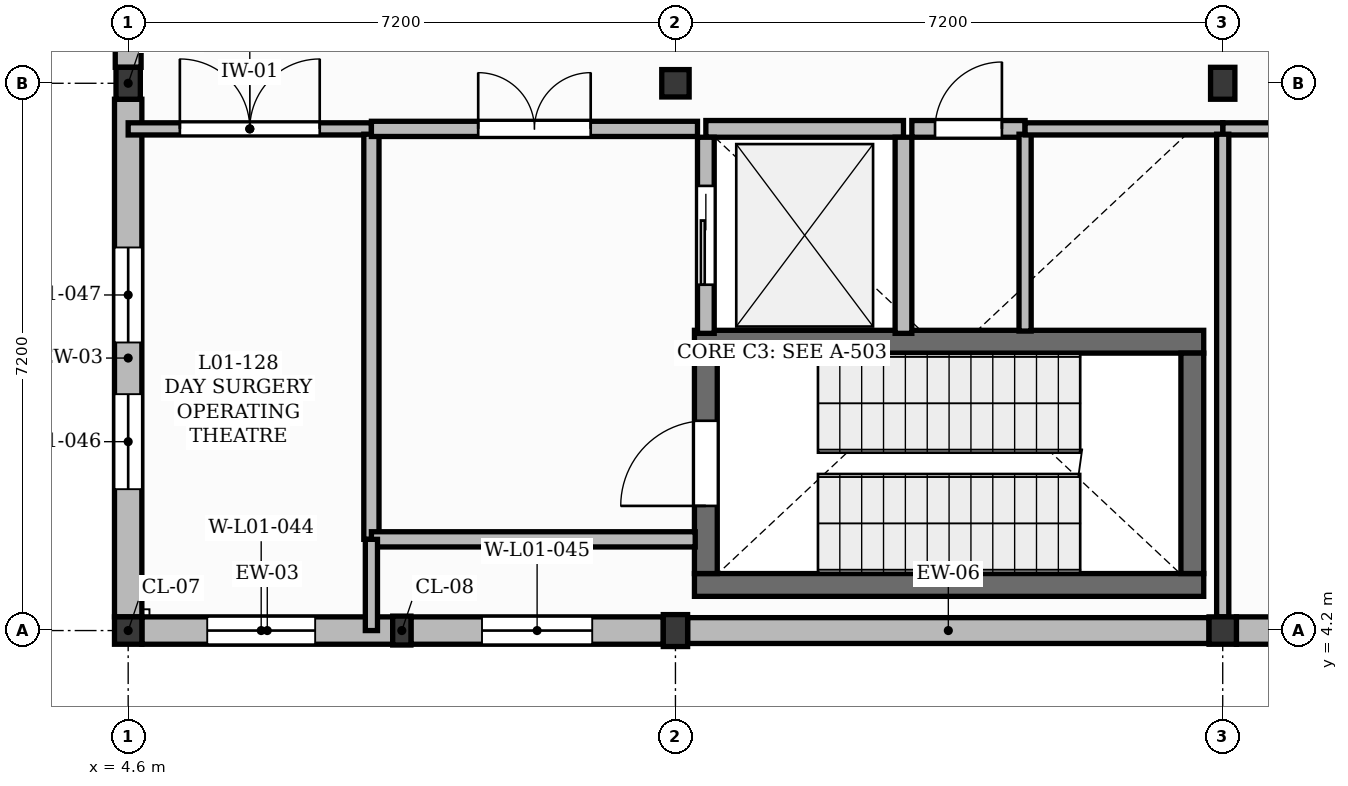
"""IFC4 building model, lengths in metres.
Left out: names, types, materials, properties, quantities, classifications, styles, units other than length and angle.
Written with IfcOpenShell. Run it as: python <this file> out.ifc"""

import sys

from ifc_helpers import new_model, si_unit, direction, frame, frame_2d, origin, origin_2d, place, context, subcontext, project, spatial, rectangle, extrude, element, fill, save


model = new_model("IFC4")
c1 = context("Model", 3, precision=1e-05, world=origin(), true_north=direction((0.0, 1.0)))
c2 = subcontext(c1, "Body", "Model", "MODEL_VIEW")
j1 = project(units=[si_unit("LENGTHUNIT", "METRE"), si_unit("PLANEANGLEUNIT", "RADIAN")], contexts=[c1])
p1 = place(None, origin())
s1 = spatial("IfcSite", under=j1, at=p1, CompositionType="ELEMENT")
p2 = place(p1, origin())
s2 = spatial("IfcBuilding", under=s1, at=p2, CompositionType="ELEMENT")
p3 = place(p2, frame((0.0, 0.0, 4.5)))
s3 = spatial("IfcBuildingStorey", under=s2, at=p3, CompositionType="ELEMENT", Elevation=4.5)
p4 = place(p3, frame((4.6, 4.2, 0.0), z_axis=(0.0, 0.0, 1.0), x_axis=(1.0, 0.0, 0.0)))
e1 = element("IfcColumn", 1, at=p4, inside=s3, PredefinedType="COLUMN", context=c2, shape_type="SweptSolid", body=[
    extrude(rectangle(XDim=0.36, YDim=0.36, at=origin_2d()), origin(), (0.0, 0.0, 1.0), 4.26),
])
for number, where, z_axis, x_axis in (
    (2, (4.6, 11.4, 0.0), (0.0, 0.0, 1.0), (1.0, 0.0, 0.0)),
    (3, (11.8, 4.2, 0.0), (0.0, 0.0, 1.0), (1.0, 0.0, 0.0)),
):
    element("IfcColumn", number, at=place(p3, frame(where, z_axis=z_axis, x_axis=x_axis)), inside=s3, PredefinedType="COLUMN", context=c2, shape_type="SweptSolid", body=[
        extrude(rectangle(XDim=0.32, YDim=0.42, at=origin_2d()), origin(), (0.0, 0.0, 1.0), 4.26),
    ])
for number, where, z_axis, x_axis in (
    (4, (11.8, 11.4, 0.0), (0.0, 0.0, 1.0), (1.0, 0.0, 0.0)),
    (5, (19.0, 4.2, 0.0), (0.0, 0.0, 1.0), (1.0, 0.0, 0.0)),
):
    element("IfcColumn", number, at=place(p3, frame(where, z_axis=z_axis, x_axis=x_axis)), inside=s3, PredefinedType="COLUMN", context=c2, shape_type="SweptSolid", body=[
        extrude(rectangle(XDim=0.36, YDim=0.36, at=origin_2d()), origin(), (0.0, 0.0, 1.0), 4.26),
    ])
p5 = place(p3, frame((19.0, 11.4, 0.0), z_axis=(0.0, 0.0, 1.0), x_axis=(1.0, 0.0, 0.0)))
e6 = element("IfcColumn", 6, at=p5, inside=s3, PredefinedType="COLUMN", context=c2, shape_type="SweptSolid", body=[
    extrude(rectangle(XDim=0.32, YDim=0.42, at=origin_2d()), origin(), (0.0, 0.0, 1.0), 4.26),
])
p6 = place(p3, frame((8.2, 4.2, 0.0), z_axis=(0.0, 0.0, 1.0), x_axis=(1.0, 0.0, 0.0)))
e7 = element("IfcColumn", 7, at=p6, inside=s3, PredefinedType="PILASTER", context=c2, shape_type="SweptSolid", body=[
    extrude(rectangle(XDim=0.24, YDim=0.38, at=origin_2d()), origin(), (0.0, 0.0, 1.0), 4.26),
])
p7 = place(p3, frame((4.78, 4.2, 0.0), z_axis=(0.0, 0.0, 1.0), x_axis=(1.0, 0.0, 0.0)))
e8 = element("IfcWall", 8, at=p7, inside=s3, PredefinedType="SOLIDWALL", context=c2, shape_type="SweptSolid", body=[
    extrude(rectangle(XDim=3.3, YDim=0.36, at=frame_2d((1.65, 0.0))), origin(), (0.0, 0.0, 1.0), 3.8),
])
p8 = place(p7, frame((0.86, 0.0, 0.9)))
e9 = element("IfcOpeningElement", 9, at=p8, cuts=e8, PredefinedType="OPENING", context=c2, shape_type="SweptSolid", body=[
    extrude(rectangle(XDim=1.42, YDim=2.4, at=frame_2d((0.71, 1.2))), frame((0.0, 0.19, 0.0), z_axis=(0.0, -1.0, 0.0), x_axis=(1.0, 0.0, 0.0)), (0.0, 0.0, 1.0), 0.38),
])
p9 = place(p3, frame((8.32, 4.2, 0.0), z_axis=(0.0, 0.0, 1.0), x_axis=(1.0, 0.0, 0.0)))
e10 = element("IfcWall", 10, at=p9, inside=s3, PredefinedType="SOLIDWALL", context=c2, shape_type="SweptSolid", body=[
    extrude(rectangle(XDim=3.32, YDim=0.36, at=frame_2d((1.66, 0.0))), origin(), (0.0, 0.0, 1.0), 3.8),
])
p10 = place(p9, frame((0.935, 0.0, 1.35)))
e11 = element("IfcOpeningElement", 11, at=p10, cuts=e10, PredefinedType="OPENING", context=c2, shape_type="SweptSolid", body=[
    extrude(rectangle(XDim=1.45, YDim=1.4, at=frame_2d((0.725, 0.7))), frame((0.0, 0.19, 0.0), z_axis=(0.0, -1.0, 0.0), x_axis=(1.0, 0.0, 0.0)), (0.0, 0.0, 1.0), 0.38),
])
p11 = place(p3, frame((4.6, 4.38, 0.0), z_axis=(0.0, 0.0, 1.0), x_axis=(0.0, 1.0, 0.0)))
e12 = element("IfcWall", 12, at=p11, inside=s3, PredefinedType="SOLIDWALL", context=c2, shape_type="SweptSolid", body=[
    extrude(rectangle(XDim=6.81, YDim=0.36, at=frame_2d((3.405, 0.0))), origin(), (0.0, 0.0, 1.0), 3.8),
])
p12 = place(p11, frame((1.68, 0.0, 1.35)))
e13 = element("IfcOpeningElement", 13, at=p12, cuts=e12, PredefinedType="OPENING", context=c2, shape_type="SweptSolid", body=[
    extrude(rectangle(XDim=1.25, YDim=1.4, at=frame_2d((0.625, 0.7))), frame((0.0, 0.19, 0.0), z_axis=(0.0, -1.0, 0.0), x_axis=(1.0, 0.0, 0.0)), (0.0, 0.0, 1.0), 0.38),
])
p13 = place(p11, frame((3.61, 0.0, 1.35)))
e14 = element("IfcOpeningElement", 14, at=p13, cuts=e12, PredefinedType="OPENING", context=c2, shape_type="SweptSolid", body=[
    extrude(rectangle(XDim=1.25, YDim=1.4, at=frame_2d((0.625, 0.7))), frame((0.0, 0.19, 0.0), z_axis=(0.0, -1.0, 0.0), x_axis=(1.0, 0.0, 0.0)), (0.0, 0.0, 1.0), 0.38),
])
p14 = place(p3, frame((4.6, 11.61, 0.0), z_axis=(0.0, 0.0, 1.0), x_axis=(0.0, 1.0, 0.0)))
e15 = element("IfcWall", 15, at=p14, inside=s3, PredefinedType="SOLIDWALL", context=c2, shape_type="SweptSolid", body=[
    extrude(rectangle(XDim=6.81, YDim=0.34, at=frame_2d((3.405, 0.0))), origin(), (0.0, 0.0, 1.0), 3.8),
])
p15 = place(p14, frame((3.415, 0.0, 1.35)))
e16 = element("IfcOpeningElement", 16, at=p15, cuts=e15, PredefinedType="OPENING", context=c2, shape_type="SweptSolid", body=[
    extrude(rectangle(XDim=1.65, YDim=1.4, at=frame_2d((0.825, 0.7))), frame((0.0, 0.18, 0.0), z_axis=(0.0, -1.0, 0.0), x_axis=(1.0, 0.0, 0.0)), (0.0, 0.0, 1.0), 0.36),
])
p16 = place(p3, frame((11.96, 4.2, 0.0), z_axis=(0.0, 0.0, 1.0), x_axis=(1.0, 0.0, 0.0)))
e17 = element("IfcWall", 17, at=p16, inside=s3, PredefinedType="SOLIDWALL", context=c2, shape_type="SweptSolid", body=[
    extrude(rectangle(XDim=6.86, YDim=0.34, at=frame_2d((3.43, 0.0))), origin(), (0.0, 0.0, 1.0), 3.8),
])
p17 = place(p3, frame((19.18, 4.2, 0.0), z_axis=(0.0, 0.0, 1.0), x_axis=(1.0, 0.0, 0.0)))
e18 = element("IfcWall", 18, at=p17, inside=s3, PredefinedType="SOLIDWALL", context=c2, shape_type="SweptSolid", body=[
    extrude(rectangle(XDim=3.3, YDim=0.36, at=frame_2d((1.65, 0.0))), origin(), (0.0, 0.0, 1.0), 3.8),
])
p18 = place(p17, frame((0.85, 0.0, 1.0)))
e19 = element("IfcOpeningElement", 19, at=p18, cuts=e18, PredefinedType="OPENING", context=c2, shape_type="SweptSolid", body=[
    extrude(rectangle(XDim=1.6, YDim=2.2, at=frame_2d((0.8, 1.1))), frame((0.0, 0.19, 0.0), z_axis=(0.0, -1.0, 0.0), x_axis=(1.0, 0.0, 0.0)), (0.0, 0.0, 1.0), 0.38),
])
for number, where, z_axis, x_axis in (
    (20, (12.05, 4.8, 0.0), (0.0, 0.0, 1.0), (1.0, 0.0, 0.0)),
    (21, (12.05, 8.0, 0.0), (0.0, 0.0, 1.0), (1.0, 0.0, 0.0)),
):
    element("IfcWall", number, at=place(p3, frame(where, z_axis=z_axis, x_axis=x_axis)), inside=s3, PredefinedType="SHEAR", context=c2, shape_type="SweptSolid", body=[
        extrude(rectangle(XDim=6.7, YDim=0.3, at=frame_2d((3.35, 0.0))), origin(), (0.0, 0.0, 1.0), 4.25),
    ])
p19 = place(p3, frame((12.2, 4.95, 0.0), z_axis=(0.0, 0.0, 1.0), x_axis=(0.0, 1.0, 0.0)))
e22 = element("IfcWall", 22, at=p19, inside=s3, PredefinedType="SHEAR", context=c2, shape_type="SweptSolid", body=[
    extrude(rectangle(XDim=2.9, YDim=0.3, at=frame_2d((1.45, 0.0))), origin(), (0.0, 0.0, 1.0), 4.25),
])
p20 = place(p19, frame((0.89, 0.0, 0.0)))
e23 = element("IfcOpeningElement", 23, at=p20, cuts=e22, PredefinedType="OPENING", context=c2, shape_type="SweptSolid", body=[
    extrude(rectangle(XDim=1.12, YDim=2.1, at=frame_2d((0.56, 1.05))), frame((0.0, 0.16, 0.0), z_axis=(0.0, -1.0, 0.0), x_axis=(1.0, 0.0, 0.0)), (0.0, 0.0, 1.0), 0.32),
])
p21 = place(p3, frame((18.6, 4.95, 0.0), z_axis=(0.0, 0.0, 1.0), x_axis=(0.0, 1.0, 0.0)))
e24 = element("IfcWall", 24, at=p21, inside=s3, PredefinedType="SHEAR", context=c2, shape_type="SweptSolid", body=[
    extrude(rectangle(XDim=2.9, YDim=0.3, at=frame_2d((1.45, 0.0))), origin(), (0.0, 0.0, 1.0), 4.25),
])
p22 = place(p3, frame((12.2, 10.8, 0.0), z_axis=(0.0, 0.0, 1.0), x_axis=(1.0, 0.0, 0.0)))
e25 = element("IfcWall", 25, at=p22, inside=s3, PredefinedType="SOLIDWALL", context=c2, shape_type="SweptSolid", body=[
    extrude(rectangle(XDim=2.6, YDim=0.22, at=frame_2d((1.3, 0.0))), origin(), (0.0, 0.0, 1.0), 4.25),
])
p23 = place(p3, frame((12.2, 8.11, 0.0), z_axis=(0.0, 0.0, 1.0), x_axis=(0.0, 1.0, 0.0)))
e26 = element("IfcWall", 26, at=p23, inside=s3, PredefinedType="SOLIDWALL", context=c2, shape_type="SweptSolid", body=[
    extrude(rectangle(XDim=2.58, YDim=0.22, at=frame_2d((1.29, 0.0))), origin(), (0.0, 0.0, 1.0), 4.25),
])
p24 = place(p23, frame((0.64, 0.0, 0.0)))
e27 = element("IfcOpeningElement", 27, at=p24, cuts=e26, PredefinedType="OPENING", context=c2, shape_type="SweptSolid", body=[
    extrude(rectangle(XDim=1.3, YDim=2.2, at=frame_2d((0.65, 1.1))), frame((0.0, 0.12, 0.0), z_axis=(0.0, -1.0, 0.0), x_axis=(1.0, 0.0, 0.0)), (0.0, 0.0, 1.0), 0.24),
])
p25 = place(p3, frame((14.8, 8.11, 0.0), z_axis=(0.0, 0.0, 1.0), x_axis=(0.0, 1.0, 0.0)))
e28 = element("IfcWall", 28, at=p25, inside=s3, PredefinedType="SOLIDWALL", context=c2, shape_type="SweptSolid", body=[
    extrude(rectangle(XDim=2.58, YDim=0.22, at=frame_2d((1.29, 0.0))), origin(), (0.0, 0.0, 1.0), 4.25),
])
p26 = place(p3, frame((4.6, 10.8, 0.0), z_axis=(0.0, 0.0, 1.0), x_axis=(1.0, 0.0, 0.0)))
e29 = element("IfcWall", 29, at=p26, inside=s3, PredefinedType="PARTITIONING", context=c2, shape_type="SweptSolid", body=[
    extrude(rectangle(XDim=3.2, YDim=0.16, at=frame_2d((1.6, 0.0))), origin(), (0.0, 0.0, 1.0), 4.18),
])
p27 = place(p26, frame((0.68, 0.0, 0.0)))
e30 = element("IfcOpeningElement", 30, at=p27, cuts=e29, PredefinedType="OPENING", context=c2, shape_type="SweptSolid", body=[
    extrude(rectangle(XDim=1.84, YDim=2.35, at=frame_2d((0.92, 1.175))), frame((0.0, 0.09, 0.0), z_axis=(0.0, -1.0, 0.0), x_axis=(1.0, 0.0, 0.0)), (0.0, 0.0, 1.0), 0.18),
])
p28 = place(p3, frame((7.8, 5.4, 0.0), z_axis=(0.0, 0.0, 1.0), x_axis=(0.0, 1.0, 0.0)))
e31 = element("IfcWall", 31, at=p28, inside=s3, PredefinedType="PARTITIONING", context=c2, shape_type="SweptSolid", body=[
    extrude(rectangle(XDim=5.33, YDim=0.2, at=frame_2d((2.665, 0.0))), origin(), (0.0, 0.0, 1.0), 4.18),
])
p29 = place(p3, frame((7.8, 10.8, 0.0), z_axis=(0.0, 0.0, 1.0), x_axis=(1.0, 0.0, 0.0)))
e32 = element("IfcWall", 32, at=p29, inside=s3, PredefinedType="PARTITIONING", context=c2, shape_type="SweptSolid", body=[
    extrude(rectangle(XDim=4.29, YDim=0.2, at=frame_2d((2.145, 0.0))), origin(), (0.0, 0.0, 1.0), 4.18),
])
p30 = place(p29, frame((1.405, 0.0, 0.0)))
e33 = element("IfcOpeningElement", 33, at=p30, cuts=e32, PredefinedType="OPENING", context=c2, shape_type="SweptSolid", body=[
    extrude(rectangle(XDim=1.48, YDim=2.25, at=frame_2d((0.74, 1.125))), frame((0.0, 0.11, 0.0), z_axis=(0.0, -1.0, 0.0), x_axis=(1.0, 0.0, 0.0)), (0.0, 0.0, 1.0), 0.22),
])
p31 = place(p3, frame((14.91, 10.8, 0.0), z_axis=(0.0, 0.0, 1.0), x_axis=(1.0, 0.0, 0.0)))
e34 = element("IfcWall", 34, at=p31, inside=s3, PredefinedType="SOLIDWALL", context=c2, shape_type="SweptSolid", body=[
    extrude(rectangle(XDim=1.49, YDim=0.22, at=frame_2d((0.745, 0.0))), origin(), (0.0, 0.0, 1.0), 4.18),
])
p32 = place(p31, frame((0.305, 0.0, 0.0)))
e35 = element("IfcOpeningElement", 35, at=p32, cuts=e34, PredefinedType="OPENING", context=c2, shape_type="SweptSolid", body=[
    extrude(rectangle(XDim=0.88, YDim=2.05, at=frame_2d((0.44, 1.025))), frame((0.0, 0.12, 0.0), z_axis=(0.0, -1.0, 0.0), x_axis=(1.0, 0.0, 0.0)), (0.0, 0.0, 1.0), 0.24),
])
p33 = place(p3, frame((19.0, 10.8, 0.0), z_axis=(0.0, 0.0, 1.0), x_axis=(1.0, 0.0, 0.0)))
e36 = element("IfcWall", 36, at=p33, inside=s3, PredefinedType="PARTITIONING", context=c2, shape_type="SweptSolid", body=[
    extrude(rectangle(XDim=7.2, YDim=0.16, at=frame_2d((3.6, 0.0))), origin(), (0.0, 0.0, 1.0), 4.18),
])
p34 = place(p33, frame((2.68, 0.0, 0.0)))
e37 = element("IfcOpeningElement", 37, at=p34, cuts=e36, PredefinedType="OPENING", context=c2, shape_type="SweptSolid", body=[
    extrude(rectangle(XDim=1.84, YDim=2.35, at=frame_2d((0.92, 1.175))), frame((0.0, 0.09, 0.0), z_axis=(0.0, -1.0, 0.0), x_axis=(1.0, 0.0, 0.0)), (0.0, 0.0, 1.0), 0.18),
])
p35 = place(p3, frame((16.4, 8.14, 0.0), z_axis=(0.0, 0.0, 1.0), x_axis=(0.0, 1.0, 0.0)))
e38 = element("IfcWall", 38, at=p35, inside=s3, PredefinedType="PARTITIONING", context=c2, shape_type="SweptSolid", body=[
    extrude(rectangle(XDim=2.59, YDim=0.16, at=frame_2d((1.295, 0.0))), origin(), (0.0, 0.0, 1.0), 4.18),
])
p36 = place(p3, frame((7.8, 5.4, 0.0), z_axis=(0.0, 0.0, 1.0), x_axis=(1.0, 0.0, 0.0)))
e39 = element("IfcWall", 39, at=p36, inside=s3, PredefinedType="PARTITIONING", context=c2, shape_type="SweptSolid", body=[
    extrude(rectangle(XDim=4.26, YDim=0.2, at=frame_2d((2.13, 0.0))), origin(), (0.0, 0.0, 1.0), 4.18),
])
p37 = place(p3, frame((16.4, 10.8, 0.0), z_axis=(0.0, 0.0, 1.0), x_axis=(1.0, 0.0, 0.0)))
e40 = element("IfcWall", 40, at=p37, inside=s3, PredefinedType="PARTITIONING", context=c2, shape_type="SweptSolid", body=[
    extrude(rectangle(XDim=2.6, YDim=0.16, at=frame_2d((1.3, 0.0))), origin(), (0.0, 0.0, 1.0), 4.18),
])
p38 = place(p3, frame((7.8, 4.2, 0.0), z_axis=(0.0, 0.0, 1.0), x_axis=(0.0, 1.0, 0.0)))
e41 = element("IfcWall", 41, at=p38, inside=s3, PredefinedType="PARTITIONING", context=c2, shape_type="SweptSolid", body=[
    extrude(rectangle(XDim=1.2, YDim=0.16, at=frame_2d((0.6, 0.0))), origin(), (0.0, 0.0, 1.0), 4.18),
])
p39 = place(p3, frame((19.0, 4.38, 0.0), z_axis=(0.0, 0.0, 1.0), x_axis=(0.0, 1.0, 0.0)))
e42 = element("IfcWall", 42, at=p39, inside=s3, PredefinedType="PARTITIONING", context=c2, shape_type="SweptSolid", body=[
    extrude(rectangle(XDim=6.35, YDim=0.16, at=frame_2d((3.175, 0.0))), origin(), (0.0, 0.0, 1.0), 3.74),
])
p40 = place(p8, origin())
e43 = element("IfcWindow", 43, at=p40, inside=s3, PartitioningType="SINGLE_PANEL", PredefinedType="WINDOW", context=c2, shape_type="SweptSolid", body=[
    extrude(rectangle(XDim=1.42, YDim=2.4, at=frame_2d((0.71, 1.2))), frame((0.0, 0.03, 0.0), z_axis=(0.0, -1.0, 0.0), x_axis=(1.0, 0.0, 0.0)), (0.0, 0.0, 1.0), 0.06),
])
fill(e9, e43)
p41 = place(p10, origin())
e44 = element("IfcWindow", 44, at=p41, inside=s3, PartitioningType="SINGLE_PANEL", PredefinedType="WINDOW", context=c2, shape_type="SweptSolid", body=[
    extrude(rectangle(XDim=1.45, YDim=1.4, at=frame_2d((0.725, 0.7))), frame((0.0, 0.03, 0.0), z_axis=(0.0, -1.0, 0.0), x_axis=(1.0, 0.0, 0.0)), (0.0, 0.0, 1.0), 0.06),
])
fill(e11, e44)
p42 = place(p12, origin())
e45 = element("IfcWindow", 45, at=p42, inside=s3, PartitioningType="SINGLE_PANEL", PredefinedType="WINDOW", context=c2, shape_type="SweptSolid", body=[
    extrude(rectangle(XDim=1.25, YDim=1.4, at=frame_2d((0.625, 0.7))), frame((0.0, 0.03, 0.0), z_axis=(0.0, -1.0, 0.0), x_axis=(1.0, 0.0, 0.0)), (0.0, 0.0, 1.0), 0.06),
])
fill(e13, e45)
p43 = place(p13, origin())
e46 = element("IfcWindow", 46, at=p43, inside=s3, PartitioningType="SINGLE_PANEL", PredefinedType="WINDOW", context=c2, shape_type="SweptSolid", body=[
    extrude(rectangle(XDim=1.25, YDim=1.4, at=frame_2d((0.625, 0.7))), frame((0.0, 0.03, 0.0), z_axis=(0.0, -1.0, 0.0), x_axis=(1.0, 0.0, 0.0)), (0.0, 0.0, 1.0), 0.06),
])
fill(e14, e46)
p44 = place(p24, origin())
e47 = element("IfcDoor", 47, at=p44, inside=s3, OperationType="SLIDING_TO_LEFT", PredefinedType="DOOR", context=c2, shape_type="SweptSolid", body=[
    extrude(rectangle(XDim=1.3, YDim=2.2, at=frame_2d((0.65, 1.1))), frame((0.0, 0.025, 0.0), z_axis=(0.0, -1.0, 0.0), x_axis=(1.0, 0.0, 0.0)), (0.0, 0.0, 1.0), 0.05),
])
fill(e27, e47)
p45 = place(p20, origin())
e48 = element("IfcDoor", 48, at=p45, inside=s3, OperationType="SINGLE_SWING_LEFT", PredefinedType="DOOR", context=c2, shape_type="SweptSolid", body=[
    extrude(rectangle(XDim=1.12, YDim=2.1, at=frame_2d((0.56, 1.05))), frame((0.0, 0.025, 0.0), z_axis=(0.0, -1.0, 0.0), x_axis=(1.0, 0.0, 0.0)), (0.0, 0.0, 1.0), 0.05),
])
fill(e23, e48)
p46 = place(p30, origin())
e49 = element("IfcDoor", 49, at=p46, inside=s3, OperationType="DOUBLE_DOOR_SINGLE_SWING", PredefinedType="DOOR", context=c2, shape_type="SweptSolid", body=[
    extrude(rectangle(XDim=1.48, YDim=2.25, at=frame_2d((0.74, 1.125))), frame((0.0, 0.025, 0.0), z_axis=(0.0, -1.0, 0.0), x_axis=(1.0, 0.0, 0.0)), (0.0, 0.0, 1.0), 0.05),
])
fill(e33, e49)
p47 = place(p32, origin())
e50 = element("IfcDoor", 50, at=p47, inside=s3, OperationType="SINGLE_SWING_RIGHT", PredefinedType="DOOR", context=c2, shape_type="SweptSolid", body=[
    extrude(rectangle(XDim=0.88, YDim=2.05, at=frame_2d((0.44, 1.025))), frame((0.0, 0.025, 0.0), z_axis=(0.0, -1.0, 0.0), x_axis=(1.0, 0.0, 0.0)), (0.0, 0.0, 1.0), 0.05),
])
fill(e35, e50)
p48 = place(p27, origin())
e51 = element("IfcDoor", 51, at=p48, inside=s3, OperationType="DOUBLE_DOOR_SINGLE_SWING", PredefinedType="DOOR", context=c2, shape_type="SweptSolid", body=[
    extrude(rectangle(XDim=1.84, YDim=2.35, at=frame_2d((0.92, 1.175))), frame((0.0, 0.025, 0.0), z_axis=(0.0, -1.0, 0.0), x_axis=(1.0, 0.0, 0.0)), (0.0, 0.0, 1.0), 0.05),
])
fill(e30, e51)
save(model, sys.argv[1])
